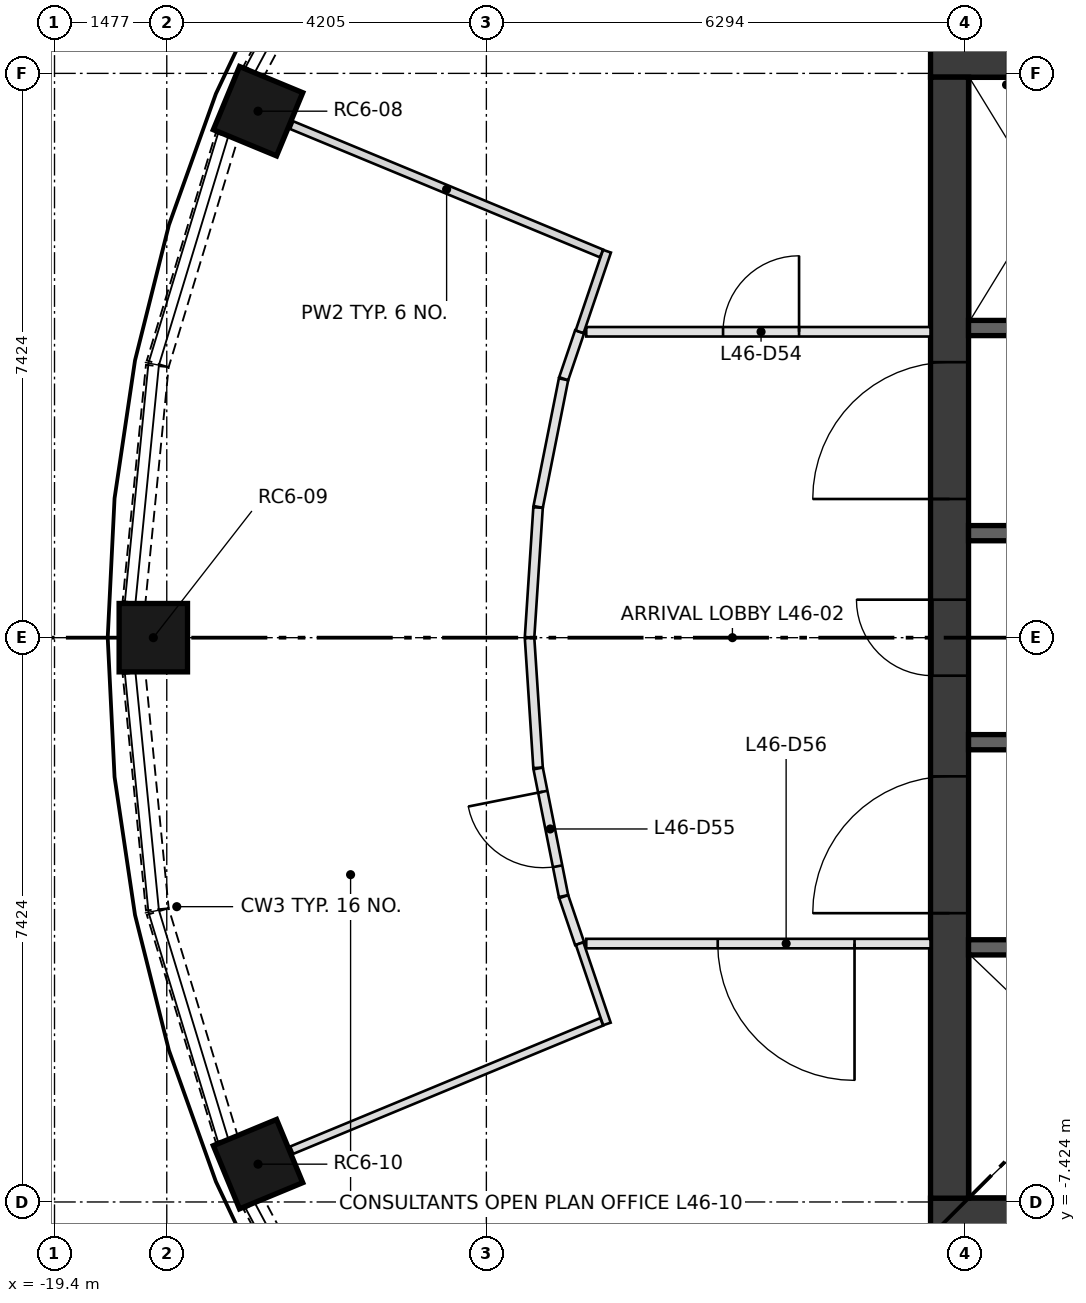
"""IFC4 building model, lengths in metres.
Left out: names, types, materials, properties, quantities, classifications, styles, units other than length and angle.
Written with IfcOpenShell. Run it as: python <this file> out.ifc"""

import sys

from ifc_helpers import new_model, si_unit, direction, frame, frame_2d, origin, origin_2d, place, context, subcontext, project, spatial, rectangle, extrude, element, fill, save


model = new_model("IFC4")
c1 = context("Model", 3, precision=1e-05, world=origin(), true_north=direction((0.0, 1.0)))
c2 = subcontext(c1, "Body", "Model", "MODEL_VIEW")
j1 = project(units=[si_unit("LENGTHUNIT", "METRE"), si_unit("PLANEANGLEUNIT", "RADIAN")], contexts=[c1])
p1 = place(None, origin())
s1 = spatial("IfcSite", under=j1, at=p1, CompositionType="ELEMENT")
p2 = place(p1, origin())
s2 = spatial("IfcBuilding", under=s1, at=p2, CompositionType="ELEMENT")
p3 = place(p2, frame((0.0, 0.0, 174.25)))
s3 = spatial("IfcBuildingStorey", under=s2, at=p3, CompositionType="ELEMENT", Elevation=174.25)
for number, where, z_axis, x_axis in (
    (1, (-16.722, 6.927, 0.0), (0.0, 0.0, 1.0), (-0.924, 0.383, 0.0)),
    (2, (-18.1, 0.0, 0.0), (0.0, 0.0, 1.0), (-1.0, 0.0, 0.0)),
    (3, (-16.722, -6.927, 0.0), (0.0, 0.0, 1.0), (-0.924, -0.383, 0.0)),
):
    element("IfcColumn", number, at=place(p3, frame(where, z_axis=z_axis, x_axis=x_axis)), inside=s3, PredefinedType="COLUMN", context=c2, shape_type="SweptSolid", body=[
        extrude(rectangle(XDim=0.9, YDim=0.9, at=origin_2d()), origin(), (0.0, 0.0, 1.0), 3.35),
    ])
for number, where, z_axis, x_axis in (
    (4, (-7.874, -7.624, 0.0), (0.0, 0.0, 1.0), (1.0, 0.0, 0.0)),
    (5, (-7.874, 7.624, 0.0), (0.0, 0.0, 1.0), (1.0, 0.0, 0.0)),
):
    element("IfcWall", number, at=place(p3, frame(where, z_axis=z_axis, x_axis=x_axis)), inside=s3, PredefinedType="SHEAR", context=c2, shape_type="SweptSolid", body=[
        extrude(rectangle(XDim=15.748, YDim=0.5, at=frame_2d((7.874, 0.0))), origin(), (0.0, 0.0, 1.0), 3.35),
    ])
p4 = place(p3, frame((-7.624, -7.374, 0.0), z_axis=(0.0, 0.0, 1.0), x_axis=(0.0, 1.0, 0.0)))
e6 = element("IfcWall", 6, at=p4, inside=s3, PredefinedType="SHEAR", context=c2, shape_type="SweptSolid", body=[
    extrude(rectangle(XDim=14.748, YDim=0.5, at=frame_2d((7.374, 0.0))), origin(), (0.0, 0.0, 1.0), 3.35),
])
p5 = place(p4, frame((6.874, 0.0, 0.0)))
e7 = element("IfcOpeningElement", 7, at=p5, cuts=e6, PredefinedType="OPENING", context=c2, shape_type="SweptSolid", body=[
    extrude(rectangle(XDim=1.0, YDim=2.1, at=frame_2d((0.5, 1.05))), frame((0.0, 0.26, 0.0), z_axis=(0.0, -1.0, 0.0), x_axis=(1.0, 0.0, 0.0)), (0.0, 0.0, 1.0), 0.52),
])
p6 = place(p4, frame((3.75, 0.0, 0.0)))
e8 = element("IfcOpeningElement", 8, at=p6, cuts=e6, PredefinedType="OPENING", context=c2, shape_type="SweptSolid", body=[
    extrude(rectangle(XDim=1.8, YDim=2.1, at=frame_2d((0.9, 1.05))), frame((0.0, 0.26, 0.0), z_axis=(0.0, -1.0, 0.0), x_axis=(1.0, 0.0, 0.0)), (0.0, 0.0, 1.0), 0.52),
])
p7 = place(p4, frame((9.198, 0.0, 0.0)))
e9 = element("IfcOpeningElement", 9, at=p7, cuts=e6, PredefinedType="OPENING", context=c2, shape_type="SweptSolid", body=[
    extrude(rectangle(XDim=1.8, YDim=2.1, at=frame_2d((0.9, 1.05))), frame((0.0, 0.26, 0.0), z_axis=(0.0, -1.0, 0.0), x_axis=(1.0, 0.0, 0.0)), (0.0, 0.0, 1.0), 0.52),
])
p8 = place(p3, frame((-7.374, -4.074, 0.0), z_axis=(0.0, 0.0, 1.0), x_axis=(1.0, 0.0, 0.0)))
e10 = element("IfcWall", 10, at=p8, inside=s3, PredefinedType="SHEAR", context=c2, shape_type="SweptSolid", body=[
    extrude(rectangle(XDim=14.748, YDim=0.2, at=frame_2d((7.374, 0.0))), origin(), (0.0, 0.0, 1.0), 3.0),
])
p9 = place(p8, frame((1.319, 0.0, 0.0)))
e11 = element("IfcOpeningElement", 11, at=p9, cuts=e10, PredefinedType="OPENING", context=c2, shape_type="SweptSolid", body=[
    extrude(rectangle(XDim=1.1, YDim=2.1, at=frame_2d((0.55, 1.05))), frame((0.0, 0.11, 0.0), z_axis=(0.0, -1.0, 0.0), x_axis=(1.0, 0.0, 0.0)), (0.0, 0.0, 1.0), 0.22),
])
p10 = place(p8, frame((4.456, 0.0, 0.0)))
e12 = element("IfcOpeningElement", 12, at=p10, cuts=e10, PredefinedType="OPENING", context=c2, shape_type="SweptSolid", body=[
    extrude(rectangle(XDim=1.1, YDim=2.1, at=frame_2d((0.55, 1.05))), frame((0.0, 0.11, 0.0), z_axis=(0.0, -1.0, 0.0), x_axis=(1.0, 0.0, 0.0)), (0.0, 0.0, 1.0), 0.22),
])
p11 = place(p8, frame((7.551, 0.0, 0.0)))
e13 = element("IfcOpeningElement", 13, at=p11, cuts=e10, PredefinedType="OPENING", context=c2, shape_type="SweptSolid", body=[
    extrude(rectangle(XDim=1.0, YDim=2.1, at=frame_2d((0.5, 1.05))), frame((0.0, 0.11, 0.0), z_axis=(0.0, -1.0, 0.0), x_axis=(1.0, 0.0, 0.0)), (0.0, 0.0, 1.0), 0.22),
])
p12 = place(p8, frame((9.914, 0.0, 0.0)))
e14 = element("IfcOpeningElement", 14, at=p12, cuts=e10, PredefinedType="OPENING", context=c2, shape_type="SweptSolid", body=[
    extrude(rectangle(XDim=1.0, YDim=2.1, at=frame_2d((0.5, 1.05))), frame((0.0, 0.11, 0.0), z_axis=(0.0, -1.0, 0.0), x_axis=(1.0, 0.0, 0.0)), (0.0, 0.0, 1.0), 0.22),
])
p13 = place(p8, frame((11.688, 0.0, 0.0)))
e15 = element("IfcOpeningElement", 15, at=p13, cuts=e10, PredefinedType="OPENING", context=c2, shape_type="SweptSolid", body=[
    extrude(rectangle(XDim=1.0, YDim=2.1, at=frame_2d((0.5, 1.05))), frame((0.0, 0.11, 0.0), z_axis=(0.0, -1.0, 0.0), x_axis=(1.0, 0.0, 0.0)), (0.0, 0.0, 1.0), 0.22),
])
p14 = place(p8, frame((13.461, 0.0, 0.0)))
e16 = element("IfcOpeningElement", 16, at=p14, cuts=e10, PredefinedType="OPENING", context=c2, shape_type="SweptSolid", body=[
    extrude(rectangle(XDim=1.0, YDim=2.1, at=frame_2d((0.5, 1.05))), frame((0.0, 0.11, 0.0), z_axis=(0.0, -1.0, 0.0), x_axis=(1.0, 0.0, 0.0)), (0.0, 0.0, 1.0), 0.22),
])
p15 = place(p3, frame((-7.374, 4.074, 0.0), z_axis=(0.0, 0.0, 1.0), x_axis=(1.0, 0.0, 0.0)))
e17 = element("IfcWall", 17, at=p15, inside=s3, PredefinedType="SHEAR", context=c2, shape_type="SweptSolid", body=[
    extrude(rectangle(XDim=7.374, YDim=0.2, at=frame_2d((3.687, 0.0))), origin(), (0.0, 0.0, 1.0), 3.0),
])
p16 = place(p15, frame((0.684, 0.0, 0.0)))
e18 = element("IfcOpeningElement", 18, at=p16, cuts=e17, PredefinedType="OPENING", context=c2, shape_type="SweptSolid", body=[
    extrude(rectangle(XDim=1.0, YDim=2.1, at=frame_2d((0.5, 1.05))), frame((0.0, 0.11, 0.0), z_axis=(0.0, -1.0, 0.0), x_axis=(1.0, 0.0, 0.0)), (0.0, 0.0, 1.0), 0.22),
])
p17 = place(p15, frame((2.453, 0.0, 0.0)))
e19 = element("IfcOpeningElement", 19, at=p17, cuts=e17, PredefinedType="OPENING", context=c2, shape_type="SweptSolid", body=[
    extrude(rectangle(XDim=1.0, YDim=2.1, at=frame_2d((0.5, 1.05))), frame((0.0, 0.11, 0.0), z_axis=(0.0, -1.0, 0.0), x_axis=(1.0, 0.0, 0.0)), (0.0, 0.0, 1.0), 0.22),
])
p18 = place(p15, frame((4.221, 0.0, 0.0)))
e20 = element("IfcOpeningElement", 20, at=p18, cuts=e17, PredefinedType="OPENING", context=c2, shape_type="SweptSolid", body=[
    extrude(rectangle(XDim=1.0, YDim=2.1, at=frame_2d((0.5, 1.05))), frame((0.0, 0.11, 0.0), z_axis=(0.0, -1.0, 0.0), x_axis=(1.0, 0.0, 0.0)), (0.0, 0.0, 1.0), 0.22),
])
p19 = place(p15, frame((5.99, 0.0, 0.0)))
e21 = element("IfcOpeningElement", 21, at=p19, cuts=e17, PredefinedType="OPENING", context=c2, shape_type="SweptSolid", body=[
    extrude(rectangle(XDim=1.0, YDim=2.1, at=frame_2d((0.5, 1.05))), frame((0.0, 0.11, 0.0), z_axis=(0.0, -1.0, 0.0), x_axis=(1.0, 0.0, 0.0)), (0.0, 0.0, 1.0), 0.22),
])
for number, where, z_axis, x_axis in (
    (22, (-7.374, -1.375, 0.0), (0.0, 0.0, 1.0), (1.0, 0.0, 0.0)),
    (23, (-7.374, 1.375, 0.0), (0.0, 0.0, 1.0), (1.0, 0.0, 0.0)),
):
    element("IfcWall", number, at=place(p3, frame(where, z_axis=z_axis, x_axis=x_axis)), inside=s3, PredefinedType="SHEAR", context=c2, shape_type="SweptSolid", body=[
        extrude(rectangle(XDim=3.0, YDim=0.2, at=frame_2d((1.5, 0.0))), origin(), (0.0, 0.0, 1.0), 3.0),
    ])
p20 = place(p3, frame((-15.306, 10.209, 0.0), z_axis=(0.0, 0.0, 1.0), x_axis=(-0.47120441036, -0.882024038027, 0.0)))
e24 = element("IfcWall", 24, at=p20, inside=s3, PredefinedType="SOLIDWALL", context=c2, shape_type="SweptSolid", body=[
    extrude(rectangle(XDim=3.125, YDim=0.3, at=frame_2d((1.562, 0.0))), origin(), (0.0, 0.0, 1.0), 0.9),
])
p21 = place(p3, frame((-17.135, 6.596, 0.0), z_axis=(0.0, 0.0, 1.0), x_axis=(-0.290083245834, -0.957001416136, 0.0)))
e25 = element("IfcWall", 25, at=p21, inside=s3, PredefinedType="SOLIDWALL", context=c2, shape_type="SweptSolid", body=[
    extrude(rectangle(XDim=3.127, YDim=0.3, at=frame_2d((1.563, 0.0))), origin(), (0.0, 0.0, 1.0), 0.9),
])
for number, where, z_axis, x_axis in (
    (26, (-18.048, 3.574, 0.0), (0.0, 0.0, 1.0), (-0.098, -0.995, 0.0)),
    (27, (-18.354, -0.464, 0.0), (0.0, 0.0, 1.0), (0.098, -0.995, 0.0)),
):
    element("IfcWall", number, at=place(p3, frame(where, z_axis=z_axis, x_axis=x_axis)), inside=s3, PredefinedType="SOLIDWALL", context=c2, shape_type="SweptSolid", body=[
        extrude(rectangle(XDim=3.125, YDim=0.3, at=frame_2d((1.563, 0.0))), origin(), (0.0, 0.0, 1.0), 0.9),
    ])
p22 = place(p3, frame((-18.042, -3.604, 0.0), z_axis=(0.0, 0.0, 1.0), x_axis=(0.290083245834, -0.957001416136, 0.0)))
e28 = element("IfcWall", 28, at=p22, inside=s3, PredefinedType="SOLIDWALL", context=c2, shape_type="SweptSolid", body=[
    extrude(rectangle(XDim=3.127, YDim=0.3, at=frame_2d((1.563, 0.0))), origin(), (0.0, 0.0, 1.0), 0.9),
])
p23 = place(p3, frame((-16.779, -7.452, 0.0), z_axis=(0.0, 0.0, 1.0), x_axis=(0.47120441036, -0.882024038027, 0.0)))
e29 = element("IfcWall", 29, at=p23, inside=s3, PredefinedType="SOLIDWALL", context=c2, shape_type="SweptSolid", body=[
    extrude(rectangle(XDim=3.125, YDim=0.3, at=frame_2d((1.562, 0.0))), origin(), (0.0, 0.0, 1.0), 0.9),
])
p24 = place(p3, frame((-12.404, 4.024, 0.0), z_axis=(0.0, 0.0, 1.0), x_axis=(1.0, 0.0, 0.0)))
e30 = element("IfcWall", 30, at=p24, inside=s3, PredefinedType="PARTITIONING", context=c2, shape_type="SweptSolid", body=[
    extrude(rectangle(XDim=4.53, YDim=0.125, at=frame_2d((2.265, 0.0))), origin(), (0.0, 0.0, 1.0), 3.0),
])
p25 = place(p24, frame((1.8, 0.0, 0.0)))
e31 = element("IfcOpeningElement", 31, at=p25, cuts=e30, PredefinedType="OPENING", context=c2, shape_type="SweptSolid", body=[
    extrude(rectangle(XDim=1.0, YDim=2.1, at=frame_2d((0.5, 1.05))), frame((0.0, 0.073, 0.0), z_axis=(0.0, -1.0, 0.0), x_axis=(1.0, 0.0, 0.0)), (0.0, 0.0, 1.0), 0.145),
])
for number, where, z_axis, x_axis in (
    (32, (-13.15, 0.004, 0.0), (0.0, 0.0, 1.0), (0.065, 0.998, 0.0)),
    (33, (-13.038, -1.712, 0.0), (0.0, 0.0, 1.0), (-0.065, 0.998, 0.0)),
    (34, (-13.037, 1.72, 0.0), (0.0, 0.0, 1.0), (0.195, 0.981, 0.0)),
):
    element("IfcWall", number, at=place(p3, frame(where, z_axis=z_axis, x_axis=x_axis)), inside=s3, PredefinedType="PARTITIONING", context=c2, shape_type="SweptSolid", body=[
        extrude(rectangle(XDim=1.712, YDim=0.125, at=frame_2d((0.856, 0.0))), origin(), (0.0, 0.0, 1.0), 3.0),
    ])
p26 = place(p3, frame((-12.703, -3.399, 0.0), z_axis=(0.0, 0.0, 1.0), x_axis=(-0.195101249107, 0.980783106806, 0.0)))
e35 = element("IfcWall", 35, at=p26, inside=s3, PredefinedType="PARTITIONING", context=c2, shape_type="SweptSolid", body=[
    extrude(rectangle(XDim=1.712, YDim=0.125, at=frame_2d((0.856, 0.0))), origin(), (0.0, 0.0, 1.0), 3.0),
])
p27 = place(p26, frame((0.4, 0.0, 0.0)))
e36 = element("IfcOpeningElement", 36, at=p27, cuts=e35, PredefinedType="OPENING", context=c2, shape_type="SweptSolid", body=[
    extrude(rectangle(XDim=1.0, YDim=2.1, at=frame_2d((0.5, 1.05))), frame((0.0, 0.073, 0.0), z_axis=(0.0, -1.0, 0.0), x_axis=(1.0, 0.0, 0.0)), (0.0, 0.0, 1.0), 0.145),
])
for number, where, z_axis, x_axis in (
    (37, (-12.701, 3.407, 0.0), (0.0, 0.0, 1.0), (0.322, 0.947, 0.0)),
    (38, (-12.491, -4.024, 0.0), (0.0, 0.0, 1.0), (-0.322, 0.947, 0.0)),
):
    element("IfcWall", number, at=place(p3, frame(where, z_axis=z_axis, x_axis=x_axis)), inside=s3, PredefinedType="PARTITIONING", context=c2, shape_type="SweptSolid", body=[
        extrude(rectangle(XDim=0.652, YDim=0.125, at=frame_2d((0.326, 0.0))), origin(), (0.0, 0.0, 1.0), 3.0),
    ])
p28 = place(p3, frame((-7.874, -4.024, 0.0), z_axis=(0.0, 0.0, 1.0), x_axis=(-1.0, 0.0, 0.0)))
e39 = element("IfcWall", 39, at=p28, inside=s3, PredefinedType="PARTITIONING", context=c2, shape_type="SweptSolid", body=[
    extrude(rectangle(XDim=4.53, YDim=0.125, at=frame_2d((2.265, 0.0))), origin(), (0.0, 0.0, 1.0), 3.0),
])
p29 = place(p28, frame((1.0, 0.0, 0.0)))
e40 = element("IfcOpeningElement", 40, at=p29, cuts=e39, PredefinedType="OPENING", context=c2, shape_type="SweptSolid", body=[
    extrude(rectangle(XDim=1.8, YDim=2.1, at=frame_2d((0.9, 1.05))), frame((0.0, 0.073, 0.0), z_axis=(0.0, -1.0, 0.0), x_axis=(1.0, 0.0, 0.0)), (0.0, 0.0, 1.0), 0.145),
])
p30 = place(p3, frame((-12.491, 4.024, 0.0), z_axis=(0.0, 0.0, 1.0), x_axis=(0.321456988234, 0.946924181081, 0.0)))
e41 = element("IfcWall", 41, at=p30, inside=s3, PredefinedType="PARTITIONING", context=c2, shape_type="SweptSolid", body=[
    extrude(rectangle(XDim=1.119, YDim=0.11, at=frame_2d((0.56, 0.0))), origin(), (0.0, 0.0, 1.0), 3.0),
])
p31 = place(p3, frame((-12.203, 5.055, 0.0), z_axis=(0.0, 0.0, 1.0), x_axis=(-0.923869102729, 0.382708611117, 0.0)))
e42 = element("IfcWall", 42, at=p31, inside=s3, PredefinedType="PARTITIONING", context=c2, shape_type="SweptSolid", body=[
    extrude(rectangle(XDim=4.411, YDim=0.11, at=frame_2d((2.206, 0.0))), origin(), (0.0, 0.0, 1.0), 3.0),
])
p32 = place(p3, frame((-12.491, -4.024, 0.0), z_axis=(0.0, 0.0, 1.0), x_axis=(0.321534356008, -0.946897913139, 0.0)))
e43 = element("IfcWall", 43, at=p32, inside=s3, PredefinedType="PARTITIONING", context=c2, shape_type="SweptSolid", body=[
    extrude(rectangle(XDim=1.117, YDim=0.105, at=frame_2d((0.559, 0.0))), origin(), (0.0, 0.0, 1.0), 3.0),
])
p33 = place(p3, frame((-12.201, -5.054, 0.0), z_axis=(0.0, 0.0, 1.0), x_axis=(-0.923879989031, -0.382682330227, 0.0)))
e44 = element("IfcWall", 44, at=p33, inside=s3, PredefinedType="PARTITIONING", context=c2, shape_type="SweptSolid", body=[
    extrude(rectangle(XDim=4.414, YDim=0.105, at=frame_2d((2.207, 0.0))), origin(), (0.0, 0.0, 1.0), 3.0),
])
p34 = place(p5, origin())
e45 = element("IfcDoor", 45, at=p34, inside=s3, OperationType="SINGLE_SWING_RIGHT", PredefinedType="DOOR", context=c2, shape_type="SweptSolid", body=[
    extrude(rectangle(XDim=1.0, YDim=2.1, at=frame_2d((0.5, 1.05))), frame((0.0, 0.25, 0.0), z_axis=(0.0, -1.0, 0.0), x_axis=(1.0, 0.0, 0.0)), (0.0, 0.0, 1.0), 0.05),
])
fill(e7, e45)
p35 = place(p6, origin())
e46 = element("IfcDoor", 46, at=p35, inside=s3, OperationType="DOUBLE_DOOR_SINGLE_SWING", PredefinedType="DOOR", context=c2, shape_type="SweptSolid", body=[
    extrude(rectangle(XDim=1.8, YDim=2.1, at=frame_2d((0.9, 1.05))), frame((0.0, 0.025, 0.0), z_axis=(0.0, -1.0, 0.0), x_axis=(1.0, 0.0, 0.0)), (0.0, 0.0, 1.0), 0.05),
])
fill(e8, e46)
p36 = place(p7, origin())
e47 = element("IfcDoor", 47, at=p36, inside=s3, OperationType="DOUBLE_DOOR_SINGLE_SWING", PredefinedType="DOOR", context=c2, shape_type="SweptSolid", body=[
    extrude(rectangle(XDim=1.8, YDim=2.1, at=frame_2d((0.9, 1.05))), frame((0.0, 0.025, 0.0), z_axis=(0.0, -1.0, 0.0), x_axis=(1.0, 0.0, 0.0)), (0.0, 0.0, 1.0), 0.05),
])
fill(e9, e47)
p37 = place(p25, origin())
e48 = element("IfcDoor", 48, at=p37, inside=s3, OperationType="SINGLE_SWING_RIGHT", PredefinedType="DOOR", context=c2, shape_type="SweptSolid", body=[
    extrude(rectangle(XDim=1.0, YDim=2.1, at=frame_2d((0.5, 1.05))), frame((0.0, 0.025, 0.0), z_axis=(0.0, -1.0, 0.0), x_axis=(1.0, 0.0, 0.0)), (0.0, 0.0, 1.0), 0.05),
])
fill(e31, e48)
p38 = place(p27, origin())
e49 = element("IfcDoor", 49, at=p38, inside=s3, OperationType="SINGLE_SWING_RIGHT", PredefinedType="DOOR", context=c2, shape_type="SweptSolid", body=[
    extrude(rectangle(XDim=1.0, YDim=2.1, at=frame_2d((0.5, 1.05))), frame((0.0, 0.025, 0.0), z_axis=(0.0, -1.0, 0.0), x_axis=(1.0, 0.0, 0.0)), (0.0, 0.0, 1.0), 0.05),
])
fill(e36, e49)
p39 = place(p29, origin())
e50 = element("IfcDoor", 50, at=p39, inside=s3, OperationType="DOUBLE_DOOR_SINGLE_SWING", PredefinedType="DOOR", context=c2, shape_type="SweptSolid", body=[
    extrude(rectangle(XDim=1.8, YDim=2.1, at=frame_2d((0.9, 1.05))), frame((0.0, 0.025, 0.0), z_axis=(0.0, -1.0, 0.0), x_axis=(1.0, 0.0, 0.0)), (0.0, 0.0, 1.0), 0.05),
])
fill(e40, e50)
save(model, sys.argv[1])
